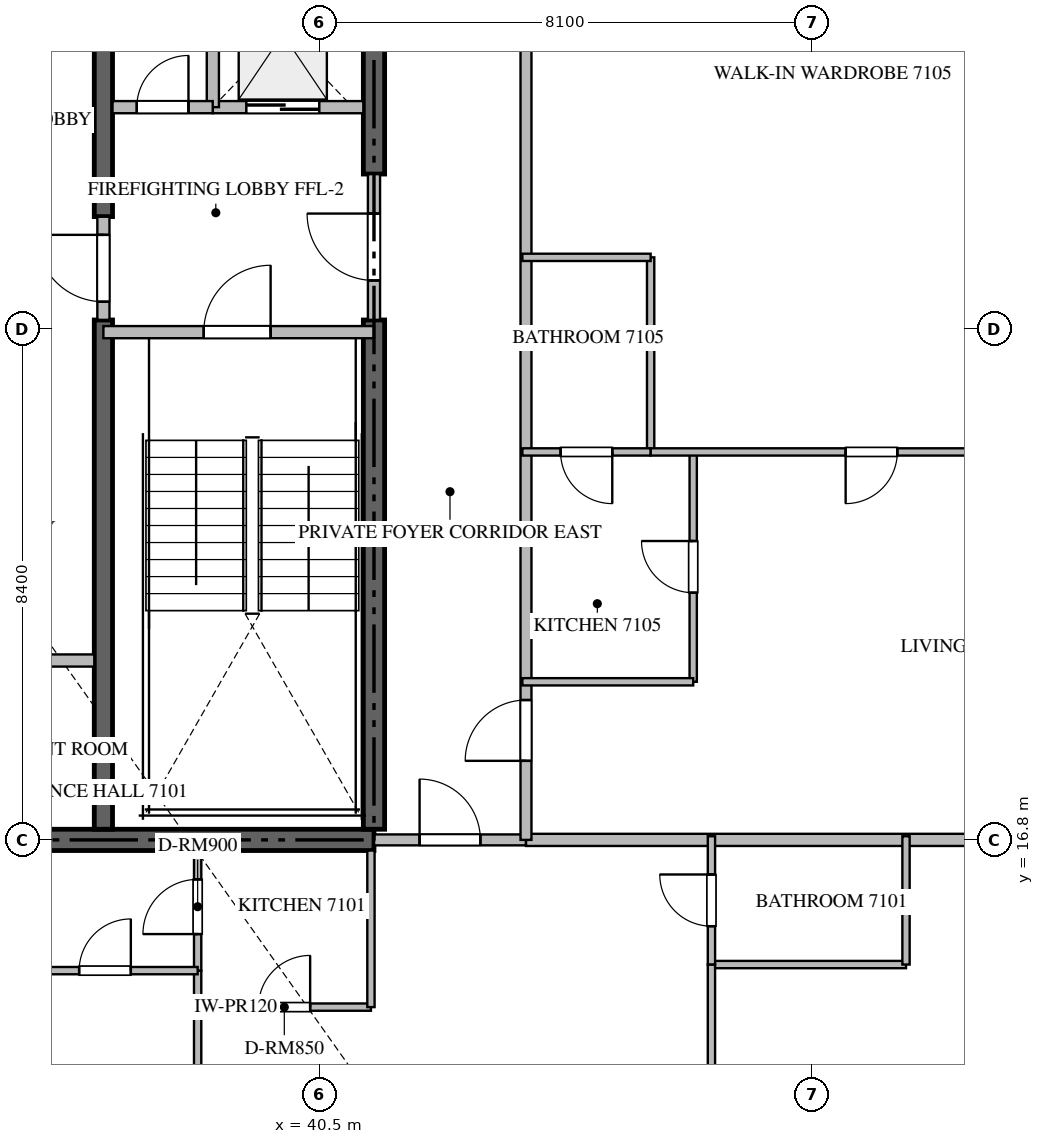
"""IFC4 building model, lengths in metres.
Left out: names, types, materials, properties, quantities, classifications, styles, units other than length and angle.
Written with IfcOpenShell. Run it as: python <this file> out.ifc"""

import sys

from ifc_helpers import new_model, si_unit, direction, frame, frame_2d, origin, place, context, subcontext, project, spatial, rectangle, extrude, source, transform, mapped, element, fill, save


model = new_model("IFC4")
c1 = context("Model", 3, precision=1e-05, world=origin(), true_north=direction((0.0, 1.0)))
c2 = subcontext(c1, "Body", "Model", "MODEL_VIEW")
j1 = project(units=[si_unit("LENGTHUNIT", "METRE"), si_unit("PLANEANGLEUNIT", "RADIAN")], contexts=[c1])
p1 = place(None, origin())
s1 = spatial("IfcSite", under=j1, at=p1, CompositionType="ELEMENT")
p2 = place(p1, origin())
s2 = spatial("IfcBuilding", under=s1, at=p2, CompositionType="ELEMENT")
p3 = place(p2, frame((0.0, 0.0, 283.6)))
s3 = spatial("IfcBuildingStorey", under=s2, at=p3, CompositionType="ELEMENT", Elevation=283.6)
p4 = place(p3, frame((23.4, 16.8, -0.26), z_axis=(0.0, 0.0, 1.0), x_axis=(1.0, 0.0, 0.0)))
e1 = element("IfcWall", 1, at=p4, inside=s3, PredefinedType="SHEAR", context=c2, shape_type="SweptSolid", body=[
    extrude(rectangle(XDim=18.0, YDim=0.35, at=frame_2d((9.0, 0.0))), origin(), (0.0, 0.0, 1.0), 3.668),
])
p5 = place(p3, frame((41.4, 16.975, -0.26), z_axis=(0.0, 0.0, 1.0), x_axis=(0.0, 1.0, 0.0)))
e2 = element("IfcWall", 2, at=p5, inside=s3, PredefinedType="SHEAR", context=c2, shape_type="SweptSolid", body=[
    extrude(rectangle(XDim=8.375, YDim=0.35, at=frame_2d((4.188, 0.0))), origin(), (0.0, 0.0, 1.0), 3.668),
])
p6 = place(p3, frame((41.4, 27.75, -0.26), z_axis=(0.0, 0.0, 1.0), x_axis=(0.0, 1.0, 0.0)))
e3 = element("IfcWall", 3, at=p6, inside=s3, PredefinedType="SHEAR", context=c2, shape_type="SweptSolid", body=[
    extrude(rectangle(XDim=5.675, YDim=0.35, at=frame_2d((2.837, 0.0))), origin(), (0.0, 0.0, 1.0), 3.668),
])
p7 = place(p3, frame((36.95, 16.975, -0.26), z_axis=(0.0, 0.0, 1.0), x_axis=(0.0, 1.0, 0.0)))
e4 = element("IfcWall", 4, at=p7, inside=s3, PredefinedType="SHEAR", context=c2, shape_type="SweptSolid", body=[
    extrude(rectangle(XDim=8.375, YDim=0.3, at=frame_2d((4.188, 0.0))), origin(), (0.0, 0.0, 1.0), 3.668),
])
p8 = place(p3, frame((36.95, 27.05, -0.26), z_axis=(0.0, 0.0, 1.0), x_axis=(0.0, 1.0, 0.0)))
e5 = element("IfcWall", 5, at=p8, inside=s3, PredefinedType="SHEAR", context=c2, shape_type="SweptSolid", body=[
    extrude(rectangle(XDim=6.375, YDim=0.3, at=frame_2d((3.188, 0.0))), origin(), (0.0, 0.0, 1.0), 3.668),
])
p9 = place(p3, frame((36.95, 25.15, 0.0), z_axis=(0.0, 0.0, 1.0), x_axis=(1.0, 0.0, 0.0)))
e6 = element("IfcWall", 6, at=p9, inside=s3, PredefinedType="STANDARD", context=c2, shape_type="SweptSolid", body=[
    extrude(rectangle(XDim=4.45, YDim=0.2, at=frame_2d((2.225, 0.0))), origin(), (0.0, 0.0, 1.0), 3.41),
])
p10 = place(p9, frame((1.65, 0.0, 0.0)))
e7 = element("IfcOpeningElement", 7, at=p10, cuts=e6, PredefinedType="OPENING", context=c2, shape_type="SweptSolid", body=[
    extrude(rectangle(XDim=1.1, YDim=2.15, at=frame_2d((0.55, 1.075))), frame((0.0, 0.11, 0.0), z_axis=(0.0, -1.0, 0.0), x_axis=(1.0, 0.0, 0.0)), (0.0, 0.0, 1.0), 0.22),
])
p11 = place(p3, frame((38.75, 28.85, 0.0), z_axis=(0.0, 0.0, 1.0), x_axis=(1.0, 0.0, 0.0)))
e8 = element("IfcWall", 8, at=p11, inside=s3, PredefinedType="STANDARD", context=c2, shape_type="SweptSolid", body=[
    extrude(rectangle(XDim=2.475, YDim=0.2, at=frame_2d((1.238, 0.0))), origin(), (0.0, 0.0, 1.0), 3.41),
])
p12 = place(p11, frame((0.55, 0.0, 0.0)))
e9 = element("IfcOpeningElement", 9, at=p12, cuts=e8, PredefinedType="OPENING", context=c2, shape_type="SweptSolid", body=[
    extrude(rectangle(XDim=1.2, YDim=2.2, at=frame_2d((0.6, 1.1))), frame((0.0, 0.11, 0.0), z_axis=(0.0, -1.0, 0.0), x_axis=(1.0, 0.0, 0.0)), (0.0, 0.0, 1.0), 0.22),
])
p13 = place(p3, frame((38.75, 28.85, 0.0), z_axis=(0.0, 0.0, 1.0), x_axis=(0.0, 1.0, 0.0)))
e10 = element("IfcWall", 10, at=p13, inside=s3, PredefinedType="STANDARD", context=c2, shape_type="SweptSolid", body=[
    extrude(rectangle(XDim=2.5, YDim=0.2, at=frame_2d((1.25, 0.0))), origin(), (0.0, 0.0, 1.0), 3.41),
])
p14 = place(p3, frame((37.1, 28.85, 0.0), z_axis=(0.0, 0.0, 1.0), x_axis=(1.0, 0.0, 0.0)))
e11 = element("IfcWall", 11, at=p14, inside=s3, PredefinedType="STANDARD", context=c2, shape_type="SweptSolid", body=[
    extrude(rectangle(XDim=1.648, YDim=0.2, at=frame_2d((0.824, 0.0))), origin(), (0.0, 0.0, 1.0), 3.41),
])
p15 = place(p14, frame((0.399, 0.0, 0.0)))
e12 = element("IfcOpeningElement", 12, at=p15, cuts=e11, PredefinedType="OPENING", context=c2, shape_type="SweptSolid", body=[
    extrude(rectangle(XDim=0.85, YDim=2.1, at=frame_2d((0.425, 1.05))), frame((0.0, 0.11, 0.0), z_axis=(0.0, -1.0, 0.0), x_axis=(1.0, 0.0, 0.0)), (0.0, 0.0, 1.0), 0.22),
])
p16 = place(p3, frame((41.4, 25.352, 0.0), z_axis=(0.0, 0.0, 1.0), x_axis=(0.0, 1.0, 0.0)))
e13 = element("IfcWall", 13, at=p16, inside=s3, PredefinedType="STANDARD", context=c2, shape_type="SweptSolid", body=[
    extrude(rectangle(XDim=2.396, YDim=0.2, at=frame_2d((1.198, 0.0))), origin(), (0.0, 0.0, 1.0), 3.41),
])
p17 = place(p16, frame((0.648, 0.0, 0.0)))
e14 = element("IfcOpeningElement", 14, at=p17, cuts=e13, PredefinedType="OPENING", context=c2, shape_type="SweptSolid", body=[
    extrude(rectangle(XDim=1.1, YDim=2.15, at=frame_2d((0.55, 1.075))), frame((0.0, 0.11, 0.0), z_axis=(0.0, -1.0, 0.0), x_axis=(1.0, 0.0, 0.0)), (0.0, 0.0, 1.0), 0.22),
])
p18 = place(p3, frame((36.95, 25.352, 0.0), z_axis=(0.0, 0.0, 1.0), x_axis=(0.0, 1.0, 0.0)))
e15 = element("IfcWall", 15, at=p18, inside=s3, PredefinedType="STANDARD", context=c2, shape_type="SweptSolid", body=[
    extrude(rectangle(XDim=1.696, YDim=0.2, at=frame_2d((0.848, 0.0))), origin(), (0.0, 0.0, 1.0), 3.41),
])
p19 = place(p18, frame((0.298, 0.0, 0.0)))
e16 = element("IfcOpeningElement", 16, at=p19, cuts=e15, PredefinedType="OPENING", context=c2, shape_type="SweptSolid", body=[
    extrude(rectangle(XDim=1.1, YDim=2.15, at=frame_2d((0.55, 1.075))), frame((0.0, 0.11, 0.0), z_axis=(0.0, -1.0, 0.0), x_axis=(1.0, 0.0, 0.0)), (0.0, 0.0, 1.0), 0.22),
])
p20 = place(p3, frame((28.0, 19.75, 0.0), z_axis=(0.0, 0.0, 1.0), x_axis=(1.0, 0.0, 0.0)))
e17 = element("IfcWall", 17, at=p20, inside=s3, PredefinedType="STANDARD", context=c2, shape_type="SweptSolid", body=[
    extrude(rectangle(XDim=8.8, YDim=0.2, at=frame_2d((4.4, 0.0))), origin(), (0.0, 0.0, 1.0), 3.41),
])
p21 = place(p20, frame((3.95, 0.0, 0.0)))
e18 = element("IfcOpeningElement", 18, at=p21, cuts=e17, PredefinedType="OPENING", context=c2, shape_type="SweptSolid", body=[
    extrude(rectangle(XDim=0.9, YDim=2.1, at=frame_2d((0.45, 1.05))), frame((0.0, 0.11, 0.0), z_axis=(0.0, -1.0, 0.0), x_axis=(1.0, 0.0, 0.0)), (0.0, 0.0, 1.0), 0.22),
])
p22 = place(p3, frame((43.9, 16.8, 0.0), z_axis=(0.0, 0.0, 1.0), x_axis=(1.0, 0.0, 0.0)))
e19 = element("IfcWall", 19, at=p22, inside=s3, PredefinedType="PARTITIONING", context=c2, shape_type="SweptSolid", body=[
    extrude(rectangle(XDim=13.418, YDim=0.2, at=frame_2d((6.709, 0.0))), origin(), (0.0, 0.0, 1.0), 3.41),
])
p23 = place(p3, frame((41.402, 16.8, 0.0), z_axis=(0.0, 0.0, 1.0), x_axis=(1.0, 0.0, 0.0)))
e20 = element("IfcWall", 20, at=p23, inside=s3, PredefinedType="PARTITIONING", context=c2, shape_type="SweptSolid", body=[
    extrude(rectangle(XDim=2.496, YDim=0.18, at=frame_2d((1.248, 0.0))), origin(), (0.0, 0.0, 1.0), 3.41),
])
p24 = place(p23, frame((0.748, 0.0, 0.0)))
e21 = element("IfcOpeningElement", 21, at=p24, cuts=e20, PredefinedType="OPENING", context=c2, shape_type="SweptSolid", body=[
    extrude(rectangle(XDim=1.0, YDim=2.15, at=frame_2d((0.5, 1.075))), frame((0.0, 0.1, 0.0), z_axis=(0.0, -1.0, 0.0), x_axis=(1.0, 0.0, 0.0)), (0.0, 0.0, 1.0), 0.2),
])
p25 = place(p3, frame((43.9, 16.8, 0.0), z_axis=(0.0, 0.0, 1.0), x_axis=(0.0, 1.0, 0.0)))
e22 = element("IfcWall", 22, at=p25, inside=s3, PredefinedType="PARTITIONING", context=c2, shape_type="SweptSolid", body=[
    extrude(rectangle(XDim=16.8, YDim=0.18, at=frame_2d((8.4, 0.0))), origin(), (0.0, 0.0, 1.0), 3.41),
])
p26 = place(p25, frame((1.3, 0.0, 0.0)))
e23 = element("IfcOpeningElement", 23, at=p26, cuts=e22, PredefinedType="OPENING", context=c2, shape_type="SweptSolid", body=[
    extrude(rectangle(XDim=1.0, YDim=2.15, at=frame_2d((0.5, 1.075))), frame((0.0, 0.1, 0.0), z_axis=(0.0, -1.0, 0.0), x_axis=(1.0, 0.0, 0.0)), (0.0, 0.0, 1.0), 0.2),
])
p27 = place(p3, frame((38.5, 14.05, 0.0), z_axis=(0.0, 0.0, 1.0), x_axis=(1.0, 0.0, 0.0)))
e24 = element("IfcWall", 24, at=p27, inside=s3, PredefinedType="PARTITIONING", context=c2, shape_type="SweptSolid", body=[
    extrude(rectangle(XDim=2.85, YDim=0.12, at=frame_2d((1.425, 0.0))), origin(), (0.0, 0.0, 1.0), 3.41),
])
p28 = place(p27, frame((1.0, 0.0, 0.0)))
e25 = element("IfcOpeningElement", 25, at=p28, cuts=e24, PredefinedType="OPENING", context=c2, shape_type="SweptSolid", body=[
    extrude(rectangle(XDim=0.85, YDim=2.1, at=frame_2d((0.425, 1.05))), frame((0.0, 0.07, 0.0), z_axis=(0.0, -1.0, 0.0), x_axis=(1.0, 0.0, 0.0)), (0.0, 0.0, 1.0), 0.14),
])
p29 = place(p3, frame((41.35, 14.05, 0.0), z_axis=(0.0, 0.0, 1.0), x_axis=(0.0, 1.0, 0.0)))
e26 = element("IfcWall", 26, at=p29, inside=s3, PredefinedType="PARTITIONING", context=c2, shape_type="SweptSolid", body=[
    extrude(rectangle(XDim=2.575, YDim=0.12, at=frame_2d((1.288, 0.0))), origin(), (0.0, 0.0, 1.0), 3.41),
])
p30 = place(p3, frame((38.5, 14.65, 0.0), z_axis=(0.0, 0.0, 1.0), x_axis=(0.0, 1.0, 0.0)))
e27 = element("IfcWall", 27, at=p30, inside=s3, PredefinedType="PARTITIONING", context=c2, shape_type="SweptSolid", body=[
    extrude(rectangle(XDim=1.975, YDim=0.12, at=frame_2d((0.988, 0.0))), origin(), (0.0, 0.0, 1.0), 3.41),
])
p31 = place(p30, frame((0.601, 0.0, 0.0)))
e28 = element("IfcOpeningElement", 28, at=p31, cuts=e27, PredefinedType="OPENING", context=c2, shape_type="SweptSolid", body=[
    extrude(rectangle(XDim=0.9, YDim=2.1, at=frame_2d((0.45, 1.05))), frame((0.0, 0.07, 0.0), z_axis=(0.0, -1.0, 0.0), x_axis=(1.0, 0.0, 0.0)), (0.0, 0.0, 1.0), 0.14),
])
p32 = place(p3, frame((38.5, 7.862, 0.0), z_axis=(0.0, 0.0, 1.0), x_axis=(0.0, 1.0, 0.0)))
e29 = element("IfcWall", 29, at=p32, inside=s3, PredefinedType="PARTITIONING", context=c2, shape_type="SweptSolid", body=[
    extrude(rectangle(XDim=6.786, YDim=0.12, at=frame_2d((3.393, 0.0))), origin(), (0.0, 0.0, 1.0), 3.41),
])
p33 = place(p3, frame((35.452, 14.65, 0.0), z_axis=(0.0, 0.0, 1.0), x_axis=(1.0, 0.0, 0.0)))
e30 = element("IfcWall", 30, at=p33, inside=s3, PredefinedType="PARTITIONING", context=c2, shape_type="SweptSolid", body=[
    extrude(rectangle(XDim=3.048, YDim=0.12, at=frame_2d((1.524, 0.0))), origin(), (0.0, 0.0, 1.0), 3.41),
])
p34 = place(p33, frame((1.099, 0.0, 0.0)))
e31 = element("IfcOpeningElement", 31, at=p34, cuts=e30, PredefinedType="OPENING", context=c2, shape_type="SweptSolid", body=[
    extrude(rectangle(XDim=0.85, YDim=2.1, at=frame_2d((0.425, 1.05))), frame((0.0, 0.07, 0.0), z_axis=(0.0, -1.0, 0.0), x_axis=(1.0, 0.0, 0.0)), (0.0, 0.0, 1.0), 0.14),
])
p35 = place(p3, frame((46.95, 14.75, 0.0), z_axis=(0.0, 0.0, 1.0), x_axis=(1.0, 0.0, 0.0)))
e32 = element("IfcWall", 32, at=p35, inside=s3, PredefinedType="PARTITIONING", context=c2, shape_type="SweptSolid", body=[
    extrude(rectangle(XDim=3.2, YDim=0.12, at=frame_2d((1.6, 0.0))), origin(), (0.0, 0.0, 1.0), 3.41),
])
p36 = place(p3, frame((50.15, 14.75, 0.0), z_axis=(0.0, 0.0, 1.0), x_axis=(0.0, 1.0, 0.0)))
e33 = element("IfcWall", 33, at=p36, inside=s3, PredefinedType="PARTITIONING", context=c2, shape_type="SweptSolid", body=[
    extrude(rectangle(XDim=2.11, YDim=0.12, at=frame_2d((1.055, 0.0))), origin(), (0.0, 0.0, 1.0), 3.41),
])
p37 = place(p3, frame((46.95, 8.67, 0.0), z_axis=(0.0, 0.0, 1.0), x_axis=(0.0, 1.0, 0.0)))
e34 = element("IfcWall", 34, at=p37, inside=s3, PredefinedType="PARTITIONING", context=c2, shape_type="SweptSolid", body=[
    extrude(rectangle(XDim=6.08, YDim=0.12, at=frame_2d((3.04, 0.0))), origin(), (0.0, 0.0, 1.0), 3.41),
])
p38 = place(p37, frame((2.615, 0.0, 0.0)))
e35 = element("IfcOpeningElement", 35, at=p38, cuts=e34, PredefinedType="OPENING", context=c2, shape_type="SweptSolid", body=[
    extrude(rectangle(XDim=0.85, YDim=2.1, at=frame_2d((0.425, 1.05))), frame((0.0, 0.07, 0.0), z_axis=(0.0, -1.0, 0.0), x_axis=(1.0, 0.0, 0.0)), (0.0, 0.0, 1.0), 0.14),
])
p39 = place(p3, frame((46.95, 14.752, 0.0), z_axis=(0.0, 0.0, 1.0), x_axis=(0.0, 1.0, 0.0)))
e36 = element("IfcWall", 36, at=p39, inside=s3, PredefinedType="PARTITIONING", context=c2, shape_type="SweptSolid", body=[
    extrude(rectangle(XDim=2.108, YDim=0.12, at=frame_2d((1.054, 0.0))), origin(), (0.0, 0.0, 1.0), 3.41),
])
p40 = place(p39, frame((0.629, 0.0, 0.0)))
e37 = element("IfcOpeningElement", 37, at=p40, cuts=e36, PredefinedType="OPENING", context=c2, shape_type="SweptSolid", body=[
    extrude(rectangle(XDim=0.85, YDim=2.1, at=frame_2d((0.425, 1.05))), frame((0.0, 0.07, 0.0), z_axis=(0.0, -1.0, 0.0), x_axis=(1.0, 0.0, 0.0)), (0.0, 0.0, 1.0), 0.14),
])
p41 = place(p3, frame((46.65, 19.4, 0.0), z_axis=(0.0, 0.0, 1.0), x_axis=(0.0, 1.0, 0.0)))
e38 = element("IfcWall", 38, at=p41, inside=s3, PredefinedType="PARTITIONING", context=c2, shape_type="SweptSolid", body=[
    extrude(rectangle(XDim=3.78, YDim=0.12, at=frame_2d((1.89, 0.0))), origin(), (0.0, 0.0, 1.0), 3.41),
])
p42 = place(p41, frame((1.465, 0.0, 0.0)))
e39 = element("IfcOpeningElement", 39, at=p42, cuts=e38, PredefinedType="OPENING", context=c2, shape_type="SweptSolid", body=[
    extrude(rectangle(XDim=0.85, YDim=2.1, at=frame_2d((0.425, 1.05))), frame((0.0, 0.07, 0.0), z_axis=(0.0, -1.0, 0.0), x_axis=(1.0, 0.0, 0.0)), (0.0, 0.0, 1.0), 0.14),
])
p43 = place(p3, frame((46.65, 19.4, 0.0), z_axis=(0.0, 0.0, 1.0), x_axis=(-1.0, 0.0, 0.0)))
e40 = element("IfcWall", 40, at=p43, inside=s3, PredefinedType="PARTITIONING", context=c2, shape_type="SweptSolid", body=[
    extrude(rectangle(XDim=2.81, YDim=0.12, at=frame_2d((1.405, 0.0))), origin(), (0.0, 0.0, 1.0), 3.41),
])
p44 = place(p3, frame((45.95, 23.18, 0.0), z_axis=(0.0, 0.0, 1.0), x_axis=(0.0, 1.0, 0.0)))
e41 = element("IfcWall", 41, at=p44, inside=s3, PredefinedType="PARTITIONING", context=c2, shape_type="SweptSolid", body=[
    extrude(rectangle(XDim=3.2, YDim=0.12, at=frame_2d((1.6, 0.0))), origin(), (0.0, 0.0, 1.0), 3.41),
])
p45 = place(p3, frame((45.95, 26.38, 0.0), z_axis=(0.0, 0.0, 1.0), x_axis=(-1.0, 0.0, 0.0)))
e42 = element("IfcWall", 42, at=p45, inside=s3, PredefinedType="PARTITIONING", context=c2, shape_type="SweptSolid", body=[
    extrude(rectangle(XDim=2.11, YDim=0.12, at=frame_2d((1.055, 0.0))), origin(), (0.0, 0.0, 1.0), 3.41),
])
p46 = place(p3, frame((53.214, 23.18, 0.0), z_axis=(0.0, 0.0, 1.0), x_axis=(-1.0, 0.0, 0.0)))
e43 = element("IfcWall", 43, at=p46, inside=s3, PredefinedType="PARTITIONING", context=c2, shape_type="SweptSolid", body=[
    extrude(rectangle(XDim=7.264, YDim=0.12, at=frame_2d((3.632, 0.0))), origin(), (0.0, 0.0, 1.0), 3.41),
])
p47 = place(p46, frame((3.207, 0.0, 0.0)))
e44 = element("IfcOpeningElement", 44, at=p47, cuts=e43, PredefinedType="OPENING", context=c2, shape_type="SweptSolid", body=[
    extrude(rectangle(XDim=0.85, YDim=2.1, at=frame_2d((0.425, 1.05))), frame((0.0, 0.07, 0.0), z_axis=(0.0, -1.0, 0.0), x_axis=(1.0, 0.0, 0.0)), (0.0, 0.0, 1.0), 0.14),
])
p48 = place(p3, frame((45.948, 23.18, 0.0), z_axis=(0.0, 0.0, 1.0), x_axis=(-1.0, 0.0, 0.0)))
e45 = element("IfcWall", 45, at=p48, inside=s3, PredefinedType="PARTITIONING", context=c2, shape_type="SweptSolid", body=[
    extrude(rectangle(XDim=2.108, YDim=0.12, at=frame_2d((1.054, 0.0))), origin(), (0.0, 0.0, 1.0), 3.41),
])
p49 = place(p48, frame((0.629, 0.0, 0.0)))
e46 = element("IfcOpeningElement", 46, at=p49, cuts=e45, PredefinedType="OPENING", context=c2, shape_type="SweptSolid", body=[
    extrude(rectangle(XDim=0.85, YDim=2.1, at=frame_2d((0.425, 1.05))), frame((0.0, 0.07, 0.0), z_axis=(0.0, -1.0, 0.0), x_axis=(1.0, 0.0, 0.0)), (0.0, 0.0, 1.0), 0.14),
])
m1 = source(origin(), c2, "Body", "SweptSolid", [
    extrude(rectangle(XDim=1.1, YDim=2.15, at=frame_2d((0.55, 1.075))), frame((0.0, 0.025, 0.0), z_axis=(0.0, -1.0, 0.0), x_axis=(1.0, 0.0, 0.0)), (0.0, 0.0, 1.0), 0.05),
])
p50 = place(p10, origin())
e47 = element("IfcDoor", 47, at=p50, inside=s3, OperationType="SINGLE_SWING_RIGHT", PredefinedType="DOOR", context=c2, shape_type="MappedRepresentation", body=[
    mapped(m1, transform((0.0, 0.0, 0.0), scale=1.0)),
])
fill(e7, e47)
m2 = source(origin(), c2, "Body", "SweptSolid", [
    extrude(rectangle(XDim=1.2, YDim=2.2, at=frame_2d((0.6, 1.1))), frame((0.0, 0.025, 0.0), z_axis=(0.0, -1.0, 0.0), x_axis=(1.0, 0.0, 0.0)), (0.0, 0.0, 1.0), 0.05),
])
p51 = place(p12, origin())
e48 = element("IfcDoor", 48, at=p51, inside=s3, OperationType="DOUBLE_DOOR_SLIDING", PredefinedType="DOOR", context=c2, shape_type="MappedRepresentation", body=[
    mapped(m2, transform((0.0, 0.0, 0.0), scale=1.0)),
])
fill(e9, e48)
m3 = source(origin(), c2, "Body", "SweptSolid", [
    extrude(rectangle(XDim=0.85, YDim=2.1, at=frame_2d((0.425, 1.05))), frame((0.0, 0.025, 0.0), z_axis=(0.0, -1.0, 0.0), x_axis=(1.0, 0.0, 0.0)), (0.0, 0.0, 1.0), 0.05),
])
p52 = place(p15, origin())
e49 = element("IfcDoor", 49, at=p52, inside=s3, OperationType="SINGLE_SWING_RIGHT", PredefinedType="DOOR", context=c2, shape_type="MappedRepresentation", body=[
    mapped(m3, transform((0.0, 0.0, 0.0), scale=1.0)),
])
fill(e12, e49)
p53 = place(p17, origin())
e50 = element("IfcDoor", 50, at=p53, inside=s3, OperationType="SINGLE_SWING_RIGHT", PredefinedType="DOOR", context=c2, shape_type="MappedRepresentation", body=[
    mapped(m1, transform((0.0, 0.0, 0.0), scale=1.0)),
])
fill(e14, e50)
p54 = place(p19, origin())
e51 = element("IfcDoor", 51, at=p54, inside=s3, OperationType="SINGLE_SWING_RIGHT", PredefinedType="DOOR", context=c2, shape_type="MappedRepresentation", body=[
    mapped(m1, transform((0.0, 0.0, 0.0), scale=1.0)),
])
fill(e16, e51)
m4 = source(origin(), c2, "Body", "SweptSolid", [
    extrude(rectangle(XDim=1.0, YDim=2.15, at=frame_2d((0.5, 1.075))), frame((0.0, 0.025, 0.0), z_axis=(0.0, -1.0, 0.0), x_axis=(1.0, 0.0, 0.0)), (0.0, 0.0, 1.0), 0.05),
])
p55 = place(p24, origin())
e52 = element("IfcDoor", 52, at=p55, inside=s3, OperationType="SINGLE_SWING_LEFT", PredefinedType="DOOR", context=c2, shape_type="MappedRepresentation", body=[
    mapped(m4, transform((0.0, 0.0, 0.0), scale=1.0)),
])
fill(e21, e52)
p56 = place(p26, origin())
e53 = element("IfcDoor", 53, at=p56, inside=s3, OperationType="SINGLE_SWING_LEFT", PredefinedType="DOOR", context=c2, shape_type="MappedRepresentation", body=[
    mapped(m4, transform((0.0, 0.0, 0.0), scale=1.0)),
])
fill(e23, e53)
p57 = place(p28, origin())
e54 = element("IfcDoor", 54, at=p57, inside=s3, OperationType="SINGLE_SWING_RIGHT", PredefinedType="DOOR", context=c2, shape_type="MappedRepresentation", body=[
    mapped(m3, transform((0.0, 0.0, 0.0), scale=1.0)),
])
fill(e25, e54)
m5 = source(origin(), c2, "Body", "SweptSolid", [
    extrude(rectangle(XDim=0.9, YDim=2.1, at=frame_2d((0.45, 1.05))), frame((0.0, 0.025, 0.0), z_axis=(0.0, -1.0, 0.0), x_axis=(1.0, 0.0, 0.0)), (0.0, 0.0, 1.0), 0.05),
])
p58 = place(p31, origin())
e55 = element("IfcDoor", 55, at=p58, inside=s3, OperationType="SINGLE_SWING_LEFT", PredefinedType="DOOR", context=c2, shape_type="MappedRepresentation", body=[
    mapped(m5, transform((0.0, 0.0, 0.0), scale=1.0)),
])
fill(e28, e55)
p59 = place(p34, origin())
e56 = element("IfcDoor", 56, at=p59, inside=s3, OperationType="SINGLE_SWING_RIGHT", PredefinedType="DOOR", context=c2, shape_type="MappedRepresentation", body=[
    mapped(m3, transform((0.0, 0.0, 0.0), scale=1.0)),
])
fill(e31, e56)
p60 = place(p40, origin())
e57 = element("IfcDoor", 57, at=p60, inside=s3, OperationType="SINGLE_SWING_RIGHT", PredefinedType="DOOR", context=c2, shape_type="MappedRepresentation", body=[
    mapped(m3, transform((0.0, 0.0, 0.0), scale=1.0)),
])
fill(e37, e57)
p61 = place(p42, origin())
e58 = element("IfcDoor", 58, at=p61, inside=s3, OperationType="SINGLE_SWING_RIGHT", PredefinedType="DOOR", context=c2, shape_type="MappedRepresentation", body=[
    mapped(m3, transform((0.0, 0.0, 0.0), scale=1.0)),
])
fill(e39, e58)
p62 = place(p47, origin())
e59 = element("IfcDoor", 59, at=p62, inside=s3, OperationType="SINGLE_SWING_RIGHT", PredefinedType="DOOR", context=c2, shape_type="MappedRepresentation", body=[
    mapped(m3, transform((0.0, 0.0, 0.0), scale=1.0)),
])
fill(e44, e59)
p63 = place(p49, origin())
e60 = element("IfcDoor", 60, at=p63, inside=s3, OperationType="SINGLE_SWING_LEFT", PredefinedType="DOOR", context=c2, shape_type="MappedRepresentation", body=[
    mapped(m3, transform((0.0, 0.0, 0.0), scale=1.0)),
])
fill(e46, e60)
save(model, sys.argv[1])
